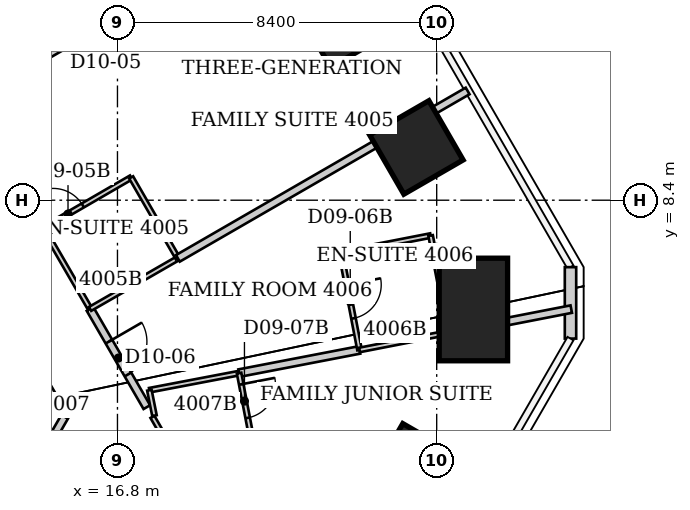
"""IFC4 building model, lengths in metres.
Left out: names, types, materials, properties, quantities, classifications, styles, units other than length and angle.
Written with IfcOpenShell. Run it as: python <this file> out.ifc"""

import sys

from ifc_helpers import new_model, si_unit, direction, frame, frame_2d, origin, origin_2d, place, context, subcontext, project, spatial, rectangle, extrude, element, fill, save


model = new_model("IFC4")
c1 = context("Model", 3, precision=1e-05, world=origin(), true_north=direction((0.0, 1.0)))
c2 = subcontext(c1, "Body", "Model", "MODEL_VIEW")
j1 = project(units=[si_unit("LENGTHUNIT", "METRE"), si_unit("PLANEANGLEUNIT", "RADIAN")], contexts=[c1])
p1 = place(None, origin())
s1 = spatial("IfcSite", under=j1, at=p1, CompositionType="ELEMENT")
p2 = place(p1, origin())
s2 = spatial("IfcBuilding", under=s1, at=p2, CompositionType="ELEMENT")
p3 = place(p2, frame((0.0, 0.0, 161.4)))
s3 = spatial("IfcBuildingStorey", under=s2, at=p3, CompositionType="ELEMENT", Elevation=161.4)
p4 = place(p3, frame((22.738, 13.128, 0.0), z_axis=(-0.051115371342, -0.029501970913, 0.998256907076), x_axis=(0.864585430267, 0.499007902036, 0.059018196136)))
e1 = element("IfcColumn", 1, at=p4, inside=s3, PredefinedType="COLUMN", context=c2, shape_type="SweptSolid", body=[
    extrude(rectangle(XDim=1.8, YDim=1.8, at=origin_2d()), origin(), (0.0, 0.0, 1.0), 3.807),
])
p5 = place(p3, frame((24.665, 9.788, 0.0), z_axis=(-0.055410421986, -0.021997424469, 0.99822131737), x_axis=(0.864198060677, 0.499682708675, 0.058982222519)))
e2 = element("IfcColumn", 2, at=p5, inside=s3, PredefinedType="COLUMN", context=c2, shape_type="SweptSolid", body=[
    extrude(rectangle(XDim=1.8, YDim=1.8, at=origin_2d()), origin(), (0.0, 0.0, 1.0), 3.807),
])
p6 = place(p3, frame((26.166, 5.524, 0.0), z_axis=(-0.06021332392, -0.012696739229, 0.998104778285), x_axis=(0.998185498237, -0.001024676941, 0.060205158806)))
e3 = element("IfcColumn", 3, at=p6, inside=s3, PredefinedType="COLUMN", context=c2, shape_type="SweptSolid", body=[
    extrude(rectangle(XDim=1.8, YDim=2.7, at=origin_2d()), origin(), (0.0, 0.0, 1.0), 3.807),
])
p7 = place(p3, frame((24.638, 1.292, 0.0), z_axis=(-0.056190949949, -0.002950666322, 0.998415680322), x_axis=(0.864380324341, -0.500621456598, 0.047167913724)))
e4 = element("IfcColumn", 4, at=p7, inside=s3, PredefinedType="COLUMN", context=c2, shape_type="SweptSolid", body=[
    extrude(rectangle(XDim=1.8, YDim=1.8, at=origin_2d()), origin(), (0.0, 0.0, 1.0), 3.806),
])
p8 = place(p3, frame((28.721, 6.638, 0.0), z_axis=(0.0, 0.0, 1.0), x_axis=(0.0, -1.0, 0.0)))
e5 = element("IfcWall", 5, at=p8, inside=s3, PredefinedType="SOLIDWALL", context=c2, shape_type="SweptSolid", body=[
    extrude(rectangle(XDim=1.88, YDim=0.3, at=frame_2d((0.94, 0.0))), origin(), (0.0, 0.0, 1.0), 3.64),
])
p9 = place(p3, frame((10.92, 10.47, 0.0), z_axis=(0.0, 0.0, 1.0), x_axis=(0.500331533983, -0.865833907919, 0.0)))
e6 = element("IfcWall", 6, at=p9, inside=s3, PredefinedType="PARTITIONING", context=c2, shape_type="SweptSolid", body=[
    extrude(rectangle(XDim=8.974, YDim=0.2, at=frame_2d((4.487, 0.0))), origin(), (0.0, 0.0, 1.0), 3.64),
])
p10 = place(p3, frame((12.9, 11.04, 0.0), z_axis=(0.0, 0.0, 1.0), x_axis=(0.86631698263, 0.499494630209, 0.0)))
e7 = element("IfcWall", 7, at=p10, inside=s3, PredefinedType="PARTITIONING", context=c2, shape_type="SweptSolid", body=[
    extrude(rectangle(XDim=8.288, YDim=0.2, at=frame_2d((4.144, 0.0))), origin(), (0.0, 0.0, 1.0), 3.64),
])
p11 = place(p10, frame((3.644, 0.0, 0.0)))
e8 = element("IfcOpeningElement", 8, at=p11, cuts=e7, PredefinedType="OPENING", context=c2, shape_type="SweptSolid", body=[
    extrude(rectangle(XDim=1.0, YDim=2.13, at=frame_2d((0.5, 1.065))), frame((0.0, 0.1, 0.0), z_axis=(0.0, -1.0, 0.0), x_axis=(1.0, 0.0, 0.0)), (0.0, 0.0, 1.0), 0.2),
])
p12 = place(p3, frame((14.85, 7.66, 0.0), z_axis=(0.0, 0.0, 1.0), x_axis=(0.501856726365, -0.86495076519, 0.0)))
e9 = element("IfcWall", 9, at=p12, inside=s3, PredefinedType="PARTITIONING", context=c2, shape_type="SweptSolid", body=[
    extrude(rectangle(XDim=2.451, YDim=0.12, at=frame_2d((1.226, 0.0))), origin(), (0.0, 0.0, 1.0), 3.64),
])
p13 = place(p3, frame((15.41, 2.7, 0.0), z_axis=(0.0, 0.0, 1.0), x_axis=(-0.50033800158, -0.865830170516, 0.0)))
e10 = element("IfcWall", 10, at=p13, inside=s3, PredefinedType="PARTITIONING", context=c2, shape_type="SweptSolid", body=[
    extrude(rectangle(XDim=8.754, YDim=0.2, at=frame_2d((4.377, 0.0))), origin(), (0.0, 0.0, 1.0), 3.64),
])
p14 = place(p3, frame((16.078, 5.539, 0.0), z_axis=(0.0, 0.0, 1.0), x_axis=(0.500694494545, -0.865624065708, 0.0)))
e11 = element("IfcWall", 11, at=p14, inside=s3, PredefinedType="PARTITIONING", context=c2, shape_type="SweptSolid", body=[
    extrude(rectangle(XDim=2.985, YDim=0.2, at=frame_2d((1.493, 0.0))), origin(), (0.0, 0.0, 1.0), 3.64),
])
p15 = place(p14, frame((0.993, 0.0, 0.0)))
e12 = element("IfcOpeningElement", 12, at=p15, cuts=e11, PredefinedType="OPENING", context=c2, shape_type="SweptSolid", body=[
    extrude(rectangle(XDim=1.0, YDim=2.13, at=frame_2d((0.5, 1.065))), frame((0.0, 0.1, 0.0), z_axis=(0.0, -1.0, 0.0), x_axis=(1.0, 0.0, 0.0)), (0.0, 0.0, 1.0), 0.2),
])
p16 = place(p3, frame((16.08, 5.54, 0.0), z_axis=(0.0, 0.0, 1.0), x_axis=(0.86663205897, 0.498947767172, 0.0)))
e13 = element("IfcWall", 13, at=p16, inside=s3, PredefinedType="PARTITIONING", context=c2, shape_type="SweptSolid", body=[
    extrude(rectangle(XDim=2.665, YDim=0.12, at=frame_2d((1.333, 0.0))), origin(), (0.0, 0.0, 1.0), 3.64),
])
p17 = place(p3, frame((17.16, 9.0, 0.0), z_axis=(0.0, 0.0, 1.0), x_axis=(-0.864966903181, -0.501828911485, 0.0)))
e14 = element("IfcWall", 14, at=p17, inside=s3, PredefinedType="PARTITIONING", context=c2, shape_type="SweptSolid", body=[
    extrude(rectangle(XDim=2.67, YDim=0.12, at=frame_2d((1.335, 0.0))), origin(), (0.0, 0.0, 1.0), 3.64),
])
p18 = place(p17, frame((1.47, 0.0, 0.0)))
e15 = element("IfcOpeningElement", 15, at=p18, cuts=e14, PredefinedType="OPENING", context=c2, shape_type="SweptSolid", body=[
    extrude(rectangle(XDim=0.9, YDim=2.03, at=frame_2d((0.45, 1.015))), frame((0.0, 0.06, 0.0), z_axis=(0.0, -1.0, 0.0), x_axis=(1.0, 0.0, 0.0)), (0.0, 0.0, 1.0), 0.12),
])
p19 = place(p3, frame((17.64, 3.4, 0.0), z_axis=(0.0, 0.0, 1.0), x_axis=(0.982288725898, 0.187373581313, 0.0)))
e16 = element("IfcWall", 16, at=p19, inside=s3, PredefinedType="PARTITIONING", context=c2, shape_type="SweptSolid", body=[
    extrude(rectangle(XDim=2.403, YDim=0.12, at=frame_2d((1.201, 0.0))), origin(), (0.0, 0.0, 1.0), 3.64),
])
p20 = place(p3, frame((17.72, 2.7, 0.0), z_axis=(0.0, 0.0, 1.0), x_axis=(0.498530782172, -0.866871997025, 0.0)))
e17 = element("IfcWall", 17, at=p20, inside=s3, PredefinedType="PARTITIONING", context=c2, shape_type="SweptSolid", body=[
    extrude(rectangle(XDim=0.461, YDim=0.12, at=frame_2d((0.231, 0.0))), origin(), (0.0, 0.0, 1.0), 3.64),
])
p21 = place(p3, frame((17.774, 2.731, 0.0), z_axis=(0.0, 0.0, 1.0), x_axis=(-0.196253874553, 0.980553117747, 0.0)))
e18 = element("IfcWall", 18, at=p21, inside=s3, PredefinedType="PARTITIONING", context=c2, shape_type="SweptSolid", body=[
    extrude(rectangle(XDim=0.682, YDim=0.12, at=frame_2d((0.341, 0.0))), origin(), (0.0, 0.0, 1.0), 3.64),
])
p22 = place(p3, frame((18.39, 6.87, 0.0), z_axis=(0.0, 0.0, 1.0), x_axis=(-0.500089055364, 0.86597398154, 0.0)))
e19 = element("IfcWall", 19, at=p22, inside=s3, PredefinedType="PARTITIONING", context=c2, shape_type="SweptSolid", body=[
    extrude(rectangle(XDim=2.459, YDim=0.12, at=frame_2d((1.23, 0.0))), origin(), (0.0, 0.0, 1.0), 3.64),
])
p23 = place(p3, frame((18.39, 6.87, 0.0), z_axis=(0.0, 0.0, 1.0), x_axis=(0.865875215531, 0.500260043506, 0.0)))
e20 = element("IfcWall", 20, at=p23, inside=s3, PredefinedType="PARTITIONING", context=c2, shape_type="SweptSolid", body=[
    extrude(rectangle(XDim=8.805, YDim=0.2, at=frame_2d((4.402, 0.0))), origin(), (0.0, 0.0, 1.0), 3.64),
])
p24 = place(p3, frame((20.0, 3.85, 0.0), z_axis=(0.0, 0.0, 1.0), x_axis=(0.981991339242, 0.188925936955, 0.0)))
e21 = element("IfcWall", 21, at=p24, inside=s3, PredefinedType="PARTITIONING", context=c2, shape_type="SweptSolid", body=[
    extrude(rectangle(XDim=3.228, YDim=0.2, at=frame_2d((1.614, 0.0))), origin(), (0.0, 0.0, 1.0), 3.64),
])
p25 = place(p3, frame((20.49, 1.3, 0.0), z_axis=(0.0, 0.0, 1.0), x_axis=(-0.188697442844, 0.982035271802, 0.0)))
e22 = element("IfcWall", 22, at=p25, inside=s3, PredefinedType="PARTITIONING", context=c2, shape_type="SweptSolid", body=[
    extrude(rectangle(XDim=2.597, YDim=0.12, at=frame_2d((1.298, 0.0))), origin(), (0.0, 0.0, 1.0), 3.64),
])
p26 = place(p25, frame((1.397, 0.0, 0.0)))
e23 = element("IfcOpeningElement", 23, at=p26, cuts=e22, PredefinedType="OPENING", context=c2, shape_type="SweptSolid", body=[
    extrude(rectangle(XDim=0.9, YDim=2.03, at=frame_2d((0.45, 1.015))), frame((0.0, 0.06, 0.0), z_axis=(0.0, -1.0, 0.0), x_axis=(1.0, 0.0, 0.0)), (0.0, 0.0, 1.0), 0.12),
])
p27 = place(p3, frame((22.68, 7.01, 0.0), z_axis=(0.0, 0.0, 1.0), x_axis=(0.188697442844, -0.982035271802, 0.0)))
e24 = element("IfcWall", 24, at=p27, inside=s3, PredefinedType="PARTITIONING", context=c2, shape_type="SweptSolid", body=[
    extrude(rectangle(XDim=2.597, YDim=0.12, at=frame_2d((1.298, 0.0))), origin(), (0.0, 0.0, 1.0), 3.64),
])
p28 = place(p27, frame((0.85, 0.0, 0.0)))
e25 = element("IfcOpeningElement", 25, at=p28, cuts=e24, PredefinedType="OPENING", context=c2, shape_type="SweptSolid", body=[
    extrude(rectangle(XDim=0.9, YDim=2.03, at=frame_2d((0.45, 1.015))), frame((0.0, 0.06, 0.0), z_axis=(0.0, -1.0, 0.0), x_axis=(1.0, 0.0, 0.0)), (0.0, 0.0, 1.0), 0.12),
])
for number, where, z_axis, x_axis in (
    (26, (23.17, 4.46, 0.0), (0.0, 0.0, 1.0), (0.982, 0.191, 0.0)),
    (27, (25.04, 7.47, 0.0), (0.0, 0.0, 1.0), (-0.982, -0.191, 0.0)),
):
    element("IfcWall", number, at=place(p3, frame(where, z_axis=z_axis, x_axis=x_axis)), inside=s3, PredefinedType="PARTITIONING", context=c2, shape_type="SweptSolid", body=[
        extrude(rectangle(XDim=2.405, YDim=0.12, at=frame_2d((1.202, 0.0))), origin(), (0.0, 0.0, 1.0), 3.64),
    ])
p29 = place(p3, frame((25.53, 4.92, 0.0), z_axis=(0.0, 0.0, 1.0), x_axis=(-0.188697442844, 0.982035271802, 0.0)))
e28 = element("IfcWall", 28, at=p29, inside=s3, PredefinedType="PARTITIONING", context=c2, shape_type="SweptSolid", body=[
    extrude(rectangle(XDim=2.597, YDim=0.12, at=frame_2d((1.298, 0.0))), origin(), (0.0, 0.0, 1.0), 1.84),
])
p30 = place(p3, frame((28.74, 5.534, 0.0), z_axis=(0.0, 0.0, 1.0), x_axis=(-0.98161461266, -0.190873655101, 0.0)))
e29 = element("IfcWall", 29, at=p30, inside=s3, PredefinedType="PARTITIONING", context=c2, shape_type="SweptSolid", body=[
    extrude(rectangle(XDim=3.271, YDim=0.2, at=frame_2d((1.635, 0.0))), origin(), (0.0, 0.0, 1.0), 3.64),
])
p31 = place(p18, origin())
e30 = element("IfcDoor", 30, at=p31, inside=s3, OperationType="SINGLE_SWING_RIGHT", PredefinedType="DOOR", context=c2, shape_type="SweptSolid", body=[
    extrude(rectangle(XDim=0.9, YDim=2.03, at=frame_2d((0.45, 1.015))), frame((0.0, 0.025, 0.0), z_axis=(0.0, -1.0, 0.0), x_axis=(1.0, 0.0, 0.0)), (0.0, 0.0, 1.0), 0.05),
])
fill(e15, e30)
p32 = place(p15, origin())
e31 = element("IfcDoor", 31, at=p32, inside=s3, OperationType="SINGLE_SWING_LEFT", PredefinedType="DOOR", context=c2, shape_type="SweptSolid", body=[
    extrude(rectangle(XDim=1.0, YDim=2.13, at=frame_2d((0.5, 1.065))), frame((0.0, 0.025, 0.0), z_axis=(0.0, -1.0, 0.0), x_axis=(1.0, 0.0, 0.0)), (0.0, 0.0, 1.0), 0.05),
])
fill(e12, e31)
p33 = place(p28, origin())
e32 = element("IfcDoor", 32, at=p33, inside=s3, OperationType="SINGLE_SWING_LEFT", PredefinedType="DOOR", context=c2, shape_type="SweptSolid", body=[
    extrude(rectangle(XDim=0.9, YDim=2.03, at=frame_2d((0.45, 1.015))), frame((0.0, 0.025, 0.0), z_axis=(0.0, -1.0, 0.0), x_axis=(1.0, 0.0, 0.0)), (0.0, 0.0, 1.0), 0.05),
])
fill(e25, e32)
p34 = place(p26, origin())
e33 = element("IfcDoor", 33, at=p34, inside=s3, OperationType="SINGLE_SWING_RIGHT", PredefinedType="DOOR", context=c2, shape_type="SweptSolid", body=[
    extrude(rectangle(XDim=0.9, YDim=2.03, at=frame_2d((0.45, 1.015))), frame((0.0, 0.025, 0.0), z_axis=(0.0, -1.0, 0.0), x_axis=(1.0, 0.0, 0.0)), (0.0, 0.0, 1.0), 0.05),
])
fill(e23, e33)
save(model, sys.argv[1])
